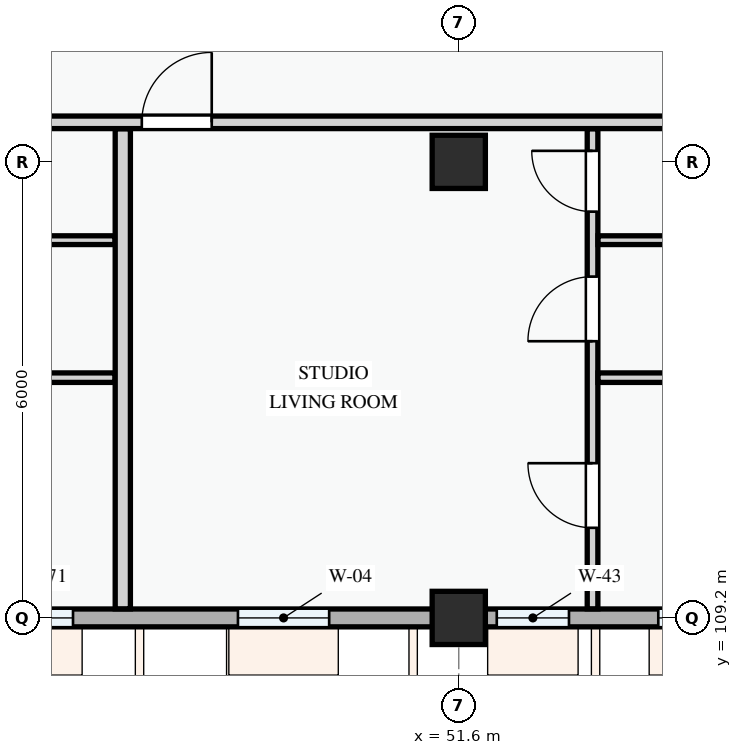
"""IFC4 building model, lengths in metres.
Left out: names, types, materials, properties, quantities, classifications, styles, units other than length and angle.
Written with IfcOpenShell. Run it as: python <this file> out.ifc"""

import sys

from ifc_helpers import new_model, si_unit, direction, frame, frame_2d, origin, origin_2d, place, context, subcontext, project, spatial, rectangle, extrude, element, fill, save


model = new_model("IFC4")
c1 = context("Model", 3, precision=1e-05, world=origin(), true_north=direction((0.0, 1.0)))
c2 = subcontext(c1, "Body", "Model", "MODEL_VIEW")
j1 = project(units=[si_unit("LENGTHUNIT", "METRE"), si_unit("PLANEANGLEUNIT", "RADIAN")], contexts=[c1])
p1 = place(None, origin())
s1 = spatial("IfcSite", under=j1, at=p1, CompositionType="ELEMENT")
p2 = place(p1, origin())
s2 = spatial("IfcBuilding", under=s1, at=p2, CompositionType="ELEMENT")
p3 = place(p2, frame((0.0, 0.0, 11.4)))
s3 = spatial("IfcBuildingStorey", under=s2, at=p3, CompositionType="ELEMENT", Elevation=11.4)
for number, where, z_axis, x_axis in (
    (1, (51.6, 109.2, 0.0), (0.0, 0.0, 1.0), (1.0, 0.0, 0.0)),
    (2, (51.6, 115.2, 0.0), (0.0, 0.0, 1.0), (1.0, 0.0, 0.0)),
):
    element("IfcColumn", number, at=place(p3, frame(where, z_axis=z_axis, x_axis=x_axis)), inside=s3, PredefinedType="COLUMN", context=c2, shape_type="SweptSolid", body=[
        extrude(rectangle(XDim=0.7, YDim=0.7, at=origin_2d()), origin(), (0.0, 0.0, 1.0), 3.3),
    ])
p4 = place(p3, frame((43.2, 109.2, 0.0), z_axis=(0.0, 0.0, 1.0), x_axis=(1.0, 0.0, 0.0)))
e3 = element("IfcWall", 3, at=p4, inside=s3, PredefinedType="STANDARD", context=c2, shape_type="SweptSolid", body=[
    extrude(rectangle(XDim=8.4, YDim=0.235, at=frame_2d((4.2, 0.0))), origin(), (0.0, 0.0, 1.0), 2.375),
])
p5 = place(p4, frame((0.845, 0.0, 0.78)))
e4 = element("IfcOpeningElement", 4, at=p5, cuts=e3, PredefinedType="OPENING", context=c2, shape_type="SweptSolid", body=[
    extrude(rectangle(XDim=2.48, YDim=1.46, at=frame_2d((1.24, 0.73))), frame((0.0, 0.127, 0.0), z_axis=(0.0, -1.0, 0.0), x_axis=(1.0, 0.0, 0.0)), (0.0, 0.0, 1.0), 0.255),
])
p6 = place(p4, frame((5.495, 0.0, 0.78)))
e5 = element("IfcOpeningElement", 5, at=p6, cuts=e3, PredefinedType="OPENING", context=c2, shape_type="SweptSolid", body=[
    extrude(rectangle(XDim=1.2, YDim=1.35, at=frame_2d((0.6, 0.675))), frame((0.0, 0.127, 0.0), z_axis=(0.0, -1.0, 0.0), x_axis=(1.0, 0.0, 0.0)), (0.0, 0.0, 1.0), 0.255),
])
p7 = place(p3, frame((51.6, 109.2, 0.0), z_axis=(0.0, 0.0, 1.0), x_axis=(1.0, 0.0, 0.0)))
e6 = element("IfcWall", 6, at=p7, inside=s3, PredefinedType="STANDARD", context=c2, shape_type="SweptSolid", body=[
    extrude(rectangle(XDim=6.0, YDim=0.235, at=frame_2d((3.0, 0.0))), origin(), (0.0, 0.0, 1.0), 2.475),
])
p8 = place(p7, frame((0.5, 0.0, 0.78)))
e7 = element("IfcOpeningElement", 7, at=p8, cuts=e6, PredefinedType="OPENING", context=c2, shape_type="SweptSolid", body=[
    extrude(rectangle(XDim=0.95, YDim=1.15, at=frame_2d((0.475, 0.575))), frame((0.0, 0.127, 0.0), z_axis=(0.0, -1.0, 0.0), x_axis=(1.0, 0.0, 0.0)), (0.0, 0.0, 1.0), 0.255),
])
p9 = place(p7, frame((2.625, 0.0, 0.78)))
e8 = element("IfcOpeningElement", 8, at=p9, cuts=e6, PredefinedType="OPENING", context=c2, shape_type="SweptSolid", body=[
    extrude(rectangle(XDim=2.32, YDim=1.5, at=frame_2d((1.16, 0.75))), frame((0.0, 0.127, 0.0), z_axis=(0.0, -1.0, 0.0), x_axis=(1.0, 0.0, 0.0)), (0.0, 0.0, 1.0), 0.255),
])
p10 = place(p3, frame((41.392, 112.361, 0.0), z_axis=(0.0, 0.0, 1.0), x_axis=(1.0, 0.0, 0.0)))
e9 = element("IfcWall", 9, at=p10, inside=s3, PredefinedType="PARTITIONING", context=c2, shape_type="SweptSolid", body=[
    extrude(rectangle(XDim=5.686, YDim=0.125, at=frame_2d((2.843, 0.0))), origin(), (0.0, 0.0, 1.0), 3.0),
])
p11 = place(p3, frame((41.392, 114.17, 0.0), z_axis=(0.0, 0.0, 1.0), x_axis=(1.0, 0.0, 0.0)))
e10 = element("IfcWall", 10, at=p11, inside=s3, PredefinedType="PARTITIONING", context=c2, shape_type="SweptSolid", body=[
    extrude(rectangle(XDim=5.686, YDim=0.115, at=frame_2d((2.843, 0.0))), origin(), (0.0, 0.0, 1.0), 3.0),
])
p12 = place(p3, frame((53.36, 109.32, 0.0), z_axis=(0.0, 0.0, 1.0), x_axis=(0.0, 1.0, 0.0)))
e11 = element("IfcWall", 11, at=p12, inside=s3, PredefinedType="PARTITIONING", context=c2, shape_type="SweptSolid", body=[
    extrude(rectangle(XDim=6.316, YDim=0.14, at=frame_2d((3.158, 0.0))), origin(), (0.0, 0.0, 1.0), 3.0),
])
p13 = place(p12, frame((1.066, 0.0, 0.0)))
e12 = element("IfcOpeningElement", 12, at=p13, cuts=e11, PredefinedType="OPENING", context=c2, shape_type="SweptSolid", body=[
    extrude(rectangle(XDim=0.85, YDim=2.1, at=frame_2d((0.425, 1.05))), frame((0.0, 0.08, 0.0), z_axis=(0.0, -1.0, 0.0), x_axis=(1.0, 0.0, 0.0)), (0.0, 0.0, 1.0), 0.16),
])
p14 = place(p12, frame((3.521, 0.0, 0.0)))
e13 = element("IfcOpeningElement", 13, at=p14, cuts=e11, PredefinedType="OPENING", context=c2, shape_type="SweptSolid", body=[
    extrude(rectangle(XDim=0.85, YDim=2.1, at=frame_2d((0.425, 1.05))), frame((0.0, 0.08, 0.0), z_axis=(0.0, -1.0, 0.0), x_axis=(1.0, 0.0, 0.0)), (0.0, 0.0, 1.0), 0.16),
])
p15 = place(p12, frame((5.225, 0.0, 0.0)))
e14 = element("IfcOpeningElement", 14, at=p15, cuts=e11, PredefinedType="OPENING", context=c2, shape_type="SweptSolid", body=[
    extrude(rectangle(XDim=0.8, YDim=2.1, at=frame_2d((0.4, 1.05))), frame((0.0, 0.08, 0.0), z_axis=(0.0, -1.0, 0.0), x_axis=(1.0, 0.0, 0.0)), (0.0, 0.0, 1.0), 0.16),
])
p16 = place(p3, frame((53.432, 112.361, 0.0), z_axis=(0.0, 0.0, 1.0), x_axis=(1.0, 0.0, 0.0)))
e15 = element("IfcWall", 15, at=p16, inside=s3, PredefinedType="PARTITIONING", context=c2, shape_type="SweptSolid", body=[
    extrude(rectangle(XDim=4.049, YDim=0.125, at=frame_2d((2.024, 0.0))), origin(), (0.0, 0.0, 1.0), 3.0),
])
p17 = place(p3, frame((53.432, 114.17, 0.0), z_axis=(0.0, 0.0, 1.0), x_axis=(1.0, 0.0, 0.0)))
e16 = element("IfcWall", 16, at=p17, inside=s3, PredefinedType="PARTITIONING", context=c2, shape_type="SweptSolid", body=[
    extrude(rectangle(XDim=4.049, YDim=0.115, at=frame_2d((2.024, 0.0))), origin(), (0.0, 0.0, 1.0), 3.0),
])
p18 = place(p3, frame((47.18, 109.32, 0.0), z_axis=(0.0, 0.0, 1.0), x_axis=(0.0, 1.0, 0.0)))
e17 = element("IfcWall", 17, at=p18, inside=s3, PredefinedType="PARTITIONING", context=c2, shape_type="SweptSolid", body=[
    extrude(rectangle(XDim=6.316, YDim=0.2, at=frame_2d((3.158, 0.0))), origin(), (0.0, 0.0, 1.0), 2.585),
])
p19 = place(p3, frame((25.15, 115.72, 0.0), z_axis=(0.0, 0.0, 1.0), x_axis=(1.0, 0.0, 0.0)))
e18 = element("IfcWall", 18, at=p19, inside=s3, PredefinedType="PARTITIONING", context=c2, shape_type="SweptSolid", body=[
    extrude(rectangle(XDim=32.331, YDim=0.165, at=frame_2d((16.165, 0.0))), origin(), (0.0, 0.0, 1.0), 3.0),
])
p20 = place(p19, frame((0.25, 0.0, 0.0)))
e19 = element("IfcOpeningElement", 19, at=p20, cuts=e18, PredefinedType="OPENING", context=c2, shape_type="SweptSolid", body=[
    extrude(rectangle(XDim=0.92, YDim=2.1, at=frame_2d((0.46, 1.05))), frame((0.0, 0.093, 0.0), z_axis=(0.0, -1.0, 0.0), x_axis=(1.0, 0.0, 0.0)), (0.0, 0.0, 1.0), 0.185),
])
p21 = place(p19, frame((14.548, 0.0, 0.0)))
e20 = element("IfcOpeningElement", 20, at=p21, cuts=e18, PredefinedType="OPENING", context=c2, shape_type="SweptSolid", body=[
    extrude(rectangle(XDim=0.96, YDim=2.12, at=frame_2d((0.48, 1.06))), frame((0.0, 0.093, 0.0), z_axis=(0.0, -1.0, 0.0), x_axis=(1.0, 0.0, 0.0)), (0.0, 0.0, 1.0), 0.185),
])
p22 = place(p19, frame((22.28, 0.0, 0.0)))
e21 = element("IfcOpeningElement", 21, at=p22, cuts=e18, PredefinedType="OPENING", context=c2, shape_type="SweptSolid", body=[
    extrude(rectangle(XDim=0.92, YDim=2.1, at=frame_2d((0.46, 1.05))), frame((0.0, 0.093, 0.0), z_axis=(0.0, -1.0, 0.0), x_axis=(1.0, 0.0, 0.0)), (0.0, 0.0, 1.0), 0.185),
])
p23 = place(p5, origin())
e22 = element("IfcWindow", 22, at=p23, inside=s3, PartitioningType="DOUBLE_PANEL_VERTICAL", PredefinedType="WINDOW", context=c2, shape_type="SweptSolid", body=[
    extrude(rectangle(XDim=2.48, YDim=1.46, at=frame_2d((1.24, 0.73))), frame((0.0, 0.03, 0.0), z_axis=(0.0, -1.0, 0.0), x_axis=(1.0, 0.0, 0.0)), (0.0, 0.0, 1.0), 0.06),
])
fill(e4, e22)
p24 = place(p6, origin())
e23 = element("IfcWindow", 23, at=p24, inside=s3, PartitioningType="SINGLE_PANEL", PredefinedType="WINDOW", context=c2, shape_type="SweptSolid", body=[
    extrude(rectangle(XDim=1.2, YDim=1.35, at=frame_2d((0.6, 0.675))), frame((0.0, 0.03, 0.0), z_axis=(0.0, -1.0, 0.0), x_axis=(1.0, 0.0, 0.0)), (0.0, 0.0, 1.0), 0.06),
])
fill(e5, e23)
p25 = place(p8, origin())
e24 = element("IfcWindow", 24, at=p25, inside=s3, PartitioningType="SINGLE_PANEL", PredefinedType="WINDOW", context=c2, shape_type="SweptSolid", body=[
    extrude(rectangle(XDim=0.95, YDim=1.15, at=frame_2d((0.475, 0.575))), frame((0.0, 0.03, 0.0), z_axis=(0.0, -1.0, 0.0), x_axis=(1.0, 0.0, 0.0)), (0.0, 0.0, 1.0), 0.06),
])
fill(e7, e24)
p26 = place(p9, origin())
e25 = element("IfcWindow", 25, at=p26, inside=s3, PartitioningType="DOUBLE_PANEL_VERTICAL", PredefinedType="WINDOW", context=c2, shape_type="SweptSolid", body=[
    extrude(rectangle(XDim=2.32, YDim=1.5, at=frame_2d((1.16, 0.75))), frame((0.0, 0.03, 0.0), z_axis=(0.0, -1.0, 0.0), x_axis=(1.0, 0.0, 0.0)), (0.0, 0.0, 1.0), 0.06),
])
fill(e8, e25)
p27 = place(p13, origin())
e26 = element("IfcDoor", 26, at=p27, inside=s3, OperationType="SINGLE_SWING_RIGHT", PredefinedType="DOOR", context=c2, shape_type="SweptSolid", body=[
    extrude(rectangle(XDim=0.85, YDim=2.1, at=frame_2d((0.425, 1.05))), frame((0.0, 0.025, 0.0), z_axis=(0.0, -1.0, 0.0), x_axis=(1.0, 0.0, 0.0)), (0.0, 0.0, 1.0), 0.05),
])
fill(e12, e26)
p28 = place(p14, origin())
e27 = element("IfcDoor", 27, at=p28, inside=s3, OperationType="SINGLE_SWING_LEFT", PredefinedType="DOOR", context=c2, shape_type="SweptSolid", body=[
    extrude(rectangle(XDim=0.85, YDim=2.1, at=frame_2d((0.425, 1.05))), frame((0.0, 0.025, 0.0), z_axis=(0.0, -1.0, 0.0), x_axis=(1.0, 0.0, 0.0)), (0.0, 0.0, 1.0), 0.05),
])
fill(e13, e27)
p29 = place(p15, origin())
e28 = element("IfcDoor", 28, at=p29, inside=s3, OperationType="SINGLE_SWING_RIGHT", PredefinedType="DOOR", context=c2, shape_type="SweptSolid", body=[
    extrude(rectangle(XDim=0.8, YDim=2.1, at=frame_2d((0.4, 1.05))), frame((0.0, 0.025, 0.0), z_axis=(0.0, -1.0, 0.0), x_axis=(1.0, 0.0, 0.0)), (0.0, 0.0, 1.0), 0.05),
])
fill(e14, e28)
p30 = place(p22, origin())
e29 = element("IfcDoor", 29, at=p30, inside=s3, OperationType="SINGLE_SWING_RIGHT", PredefinedType="DOOR", context=c2, shape_type="SweptSolid", body=[
    extrude(rectangle(XDim=0.92, YDim=2.1, at=frame_2d((0.46, 1.05))), frame((0.0, 0.025, 0.0), z_axis=(0.0, -1.0, 0.0), x_axis=(1.0, 0.0, 0.0)), (0.0, 0.0, 1.0), 0.05),
])
fill(e21, e29)
save(model, sys.argv[1])
